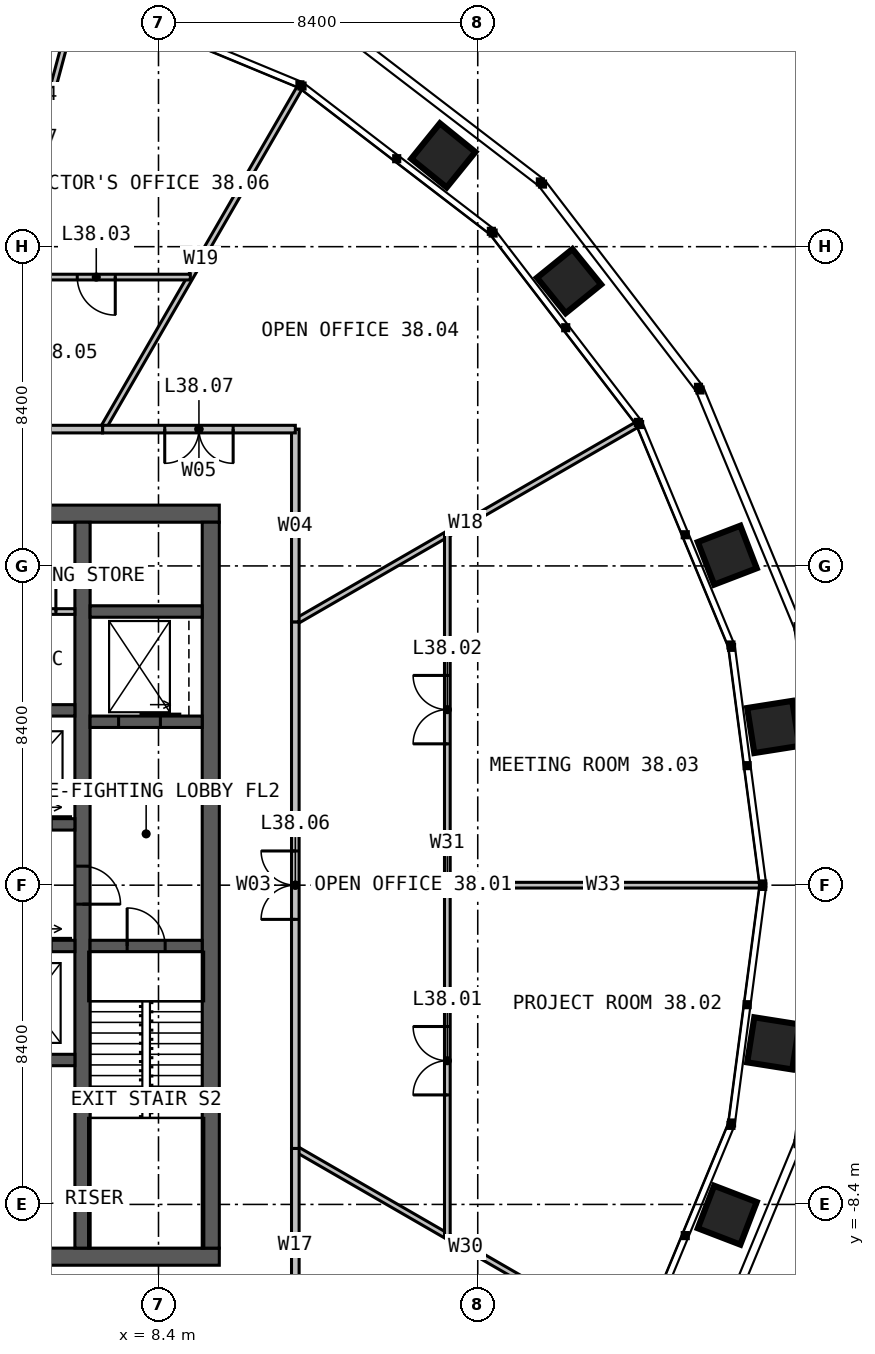
"""IFC4 building model, lengths in metres.
Left out: names, types, materials, properties, quantities, classifications, styles, units other than length and angle.
Written with IfcOpenShell. Run it as: python <this file> out.ifc"""

import sys

from ifc_helpers import new_model, si_unit, direction, frame, frame_2d, origin, place, context, subcontext, project, spatial, rectangle, extrude, element, fill, save


model = new_model("IFC4")
c1 = context("Model", 3, precision=1e-05, world=origin(), true_north=direction((0.0, 1.0)))
c2 = subcontext(c1, "Body", "Model", "MODEL_VIEW")
j1 = project(units=[si_unit("LENGTHUNIT", "METRE"), si_unit("PLANEANGLEUNIT", "RADIAN")], contexts=[c1])
p1 = place(None, origin())
s1 = spatial("IfcSite", under=j1, at=p1, CompositionType="ELEMENT")
p2 = place(p1, origin())
s2 = spatial("IfcBuilding", under=s1, at=p2, CompositionType="ELEMENT")
p3 = place(p2, frame((0.0, 0.0, 159.0)))
s3 = spatial("IfcBuildingStorey", under=s2, at=p3, CompositionType="ELEMENT", Elevation=159.0)
p4 = place(p3, frame((-10.0, 9.775, 0.0), z_axis=(0.0, 0.0, 1.0), x_axis=(1.0, 0.0, 0.0)))
e1 = element("IfcWall", 1, at=p4, inside=s3, PredefinedType="SOLIDWALL", context=c2, shape_type="SweptSolid", body=[
    extrude(rectangle(XDim=20.0, YDim=0.45, at=frame_2d((10.0, 0.0))), origin(), (0.0, 0.0, 1.0), 4.0),
])
p5 = place(p4, frame((9.4, 0.0, 0.0)))
e2 = element("IfcOpeningElement", 2, at=p5, cuts=e1, PredefinedType="OPENING", context=c2, shape_type="SweptSolid", body=[
    extrude(rectangle(XDim=1.2, YDim=2.2, at=frame_2d((0.6, 1.1))), frame((0.0, 0.235, 0.0), z_axis=(0.0, -1.0, 0.0), x_axis=(1.0, 0.0, 0.0)), (0.0, 0.0, 1.0), 0.47),
])
p6 = place(p3, frame((10.0, -9.775, 0.0), z_axis=(0.0, 0.0, 1.0), x_axis=(-1.0, 0.0, 0.0)))
e3 = element("IfcWall", 3, at=p6, inside=s3, PredefinedType="SOLIDWALL", context=c2, shape_type="SweptSolid", body=[
    extrude(rectangle(XDim=20.0, YDim=0.45, at=frame_2d((10.0, 0.0))), origin(), (0.0, 0.0, 1.0), 4.0),
])
p7 = place(p6, frame((6.875, 0.0, 0.0)))
e4 = element("IfcOpeningElement", 4, at=p7, cuts=e3, PredefinedType="OPENING", context=c2, shape_type="SweptSolid", body=[
    extrude(rectangle(XDim=1.2, YDim=2.2, at=frame_2d((0.6, 1.1))), frame((0.0, 0.235, 0.0), z_axis=(0.0, -1.0, 0.0), x_axis=(1.0, 0.0, 0.0)), (0.0, 0.0, 1.0), 0.47),
])
p8 = place(p3, frame((9.775, -9.55, 0.0), z_axis=(0.0, 0.0, 1.0), x_axis=(0.0, 1.0, 0.0)))
e5 = element("IfcWall", 5, at=p8, inside=s3, PredefinedType="SOLIDWALL", context=c2, shape_type="SweptSolid", body=[
    extrude(rectangle(XDim=19.1, YDim=0.45, at=frame_2d((9.55, 0.0))), origin(), (0.0, 0.0, 1.0), 4.0),
])
p9 = place(p3, frame((6.4, 9.55, 0.0), z_axis=(0.0, 0.0, 1.0), x_axis=(0.0, -1.0, 0.0)))
e6 = element("IfcWall", 6, at=p9, inside=s3, PredefinedType="SOLIDWALL", context=c2, shape_type="SweptSolid", body=[
    extrude(rectangle(XDim=19.1, YDim=0.4, at=frame_2d((9.55, 0.0))), origin(), (0.0, 0.0, 1.0), 4.0),
])
p10 = place(p9, frame((9.05, 0.0, 0.0)))
e7 = element("IfcOpeningElement", 7, at=p10, cuts=e6, PredefinedType="OPENING", context=c2, shape_type="SweptSolid", body=[
    extrude(rectangle(XDim=1.0, YDim=2.2, at=frame_2d((0.5, 1.1))), frame((0.0, 0.21, 0.0), z_axis=(0.0, -1.0, 0.0), x_axis=(1.0, 0.0, 0.0)), (0.0, 0.0, 1.0), 0.42),
])
p11 = place(p3, frame((1.35, 1.6, 0.0), z_axis=(0.0, 0.0, 1.0), x_axis=(1.0, 0.0, 0.0)))
e8 = element("IfcWall", 8, at=p11, inside=s3, PredefinedType="SOLIDWALL", context=c2, shape_type="SweptSolid", body=[
    extrude(rectangle(XDim=4.85, YDim=0.3, at=frame_2d((2.425, 0.0))), origin(), (0.0, 0.0, 1.0), 4.0),
])
p12 = place(p11, frame((0.6, 0.0, 0.0)))
e9 = element("IfcOpeningElement", 9, at=p12, cuts=e8, PredefinedType="OPENING", context=c2, shape_type="SweptSolid", body=[
    extrude(rectangle(XDim=1.1, YDim=2.2, at=frame_2d((0.55, 1.1))), frame((0.0, 0.16, 0.0), z_axis=(0.0, -1.0, 0.0), x_axis=(1.0, 0.0, 0.0)), (0.0, 0.0, 1.0), 0.32),
])
p13 = place(p11, frame((3.125, 0.0, 0.0)))
e10 = element("IfcOpeningElement", 10, at=p13, cuts=e8, PredefinedType="OPENING", context=c2, shape_type="SweptSolid", body=[
    extrude(rectangle(XDim=1.1, YDim=2.2, at=frame_2d((0.55, 1.1))), frame((0.0, 0.16, 0.0), z_axis=(0.0, -1.0, 0.0), x_axis=(1.0, 0.0, 0.0)), (0.0, 0.0, 1.0), 0.32),
])
p14 = place(p3, frame((1.35, 4.6, 0.0), z_axis=(0.0, 0.0, 1.0), x_axis=(1.0, 0.0, 0.0)))
e11 = element("IfcWall", 11, at=p14, inside=s3, PredefinedType="SOLIDWALL", context=c2, shape_type="SweptSolid", body=[
    extrude(rectangle(XDim=4.85, YDim=0.3, at=frame_2d((2.425, 0.0))), origin(), (0.0, 0.0, 1.0), 4.0),
])
p15 = place(p3, frame((3.85, -1.6, 0.0), z_axis=(0.0, 0.0, 1.0), x_axis=(1.0, 0.0, 0.0)))
e12 = element("IfcWall", 12, at=p15, inside=s3, PredefinedType="SOLIDWALL", context=c2, shape_type="SweptSolid", body=[
    extrude(rectangle(XDim=2.35, YDim=0.3, at=frame_2d((1.175, 0.0))), origin(), (0.0, 0.0, 1.0), 4.0),
])
p16 = place(p15, frame((0.625, 0.0, 0.0)))
e13 = element("IfcOpeningElement", 13, at=p16, cuts=e12, PredefinedType="OPENING", context=c2, shape_type="SweptSolid", body=[
    extrude(rectangle(XDim=1.1, YDim=2.2, at=frame_2d((0.55, 1.1))), frame((0.0, 0.16, 0.0), z_axis=(0.0, -1.0, 0.0), x_axis=(1.0, 0.0, 0.0)), (0.0, 0.0, 1.0), 0.32),
])
p17 = place(p3, frame((3.85, -4.6, 0.0), z_axis=(0.0, 0.0, 1.0), x_axis=(1.0, 0.0, 0.0)))
e14 = element("IfcWall", 14, at=p17, inside=s3, PredefinedType="SOLIDWALL", context=c2, shape_type="SweptSolid", body=[
    extrude(rectangle(XDim=2.35, YDim=0.3, at=frame_2d((1.175, 0.0))), origin(), (0.0, 0.0, 1.0), 4.0),
])
p18 = place(p3, frame((6.6, -1.6, 0.0), z_axis=(0.0, 0.0, 1.0), x_axis=(1.0, 0.0, 0.0)))
e15 = element("IfcWall", 15, at=p18, inside=s3, PredefinedType="SOLIDWALL", context=c2, shape_type="SweptSolid", body=[
    extrude(rectangle(XDim=2.95, YDim=0.3, at=frame_2d((1.475, 0.0))), origin(), (0.0, 0.0, 1.0), 4.0),
])
p19 = place(p18, frame((0.975, 0.0, 0.0)))
e16 = element("IfcOpeningElement", 16, at=p19, cuts=e15, PredefinedType="OPENING", context=c2, shape_type="SweptSolid", body=[
    extrude(rectangle(XDim=1.0, YDim=2.2, at=frame_2d((0.5, 1.1))), frame((0.0, 0.16, 0.0), z_axis=(0.0, -1.0, 0.0), x_axis=(1.0, 0.0, 0.0)), (0.0, 0.0, 1.0), 0.32),
])
p20 = place(p3, frame((6.6, 4.3, 0.0), z_axis=(0.0, 0.0, 1.0), x_axis=(1.0, 0.0, 0.0)))
e17 = element("IfcWall", 17, at=p20, inside=s3, PredefinedType="SOLIDWALL", context=c2, shape_type="SweptSolid", body=[
    extrude(rectangle(XDim=2.95, YDim=0.3, at=frame_2d((1.475, 0.0))), origin(), (0.0, 0.0, 1.0), 4.0),
])
p21 = place(p20, frame((0.75, 0.0, 0.0)))
e18 = element("IfcOpeningElement", 18, at=p21, cuts=e17, PredefinedType="OPENING", context=c2, shape_type="SweptSolid", body=[
    extrude(rectangle(XDim=1.1, YDim=2.2, at=frame_2d((0.55, 1.1))), frame((0.0, 0.16, 0.0), z_axis=(0.0, -1.0, 0.0), x_axis=(1.0, 0.0, 0.0)), (0.0, 0.0, 1.0), 0.32),
])
p22 = place(p3, frame((6.6, 7.2, 0.0), z_axis=(0.0, 0.0, 1.0), x_axis=(1.0, 0.0, 0.0)))
e19 = element("IfcWall", 19, at=p22, inside=s3, PredefinedType="SOLIDWALL", context=c2, shape_type="SweptSolid", body=[
    extrude(rectangle(XDim=2.95, YDim=0.3, at=frame_2d((1.475, 0.0))), origin(), (0.0, 0.0, 1.0), 4.0),
])
p23 = place(p3, frame((1.35, 7.2, 0.0), z_axis=(0.0, 0.0, 1.0), x_axis=(1.0, 0.0, 0.0)))
e20 = element("IfcWall", 20, at=p23, inside=s3, PredefinedType="PARTITIONING", context=c2, shape_type="SweptSolid", body=[
    extrude(rectangle(XDim=4.85, YDim=0.15, at=frame_2d((2.425, 0.0))), origin(), (0.0, 0.0, 1.0), 3.75),
])
p24 = place(p23, frame((3.45, 0.0, 0.0)))
e21 = element("IfcOpeningElement", 21, at=p24, cuts=e20, PredefinedType="OPENING", context=c2, shape_type="SweptSolid", body=[
    extrude(rectangle(XDim=0.9, YDim=2.2, at=frame_2d((0.45, 1.1))), frame((0.0, 0.085, 0.0), z_axis=(0.0, -1.0, 0.0), x_axis=(1.0, 0.0, 0.0)), (0.0, 0.0, 1.0), 0.17),
])
for number, where, z_axis, x_axis in (
    (22, (12.0, -6.928, 0.0), (0.0, 0.0, 1.0), (0.866, -0.5, 0.0)),
    (23, (12.0, 6.928, 0.0), (0.0, 0.0, 1.0), (0.866, 0.5, 0.0)),
    (24, (6.928, 12.0, 0.0), (0.0, 0.0, 1.0), (0.5, 0.866, 0.0)),
):
    element("IfcWall", number, at=place(p3, frame(where, z_axis=z_axis, x_axis=x_axis)), inside=s3, PredefinedType="PARTITIONING", context=c2, shape_type="SweptSolid", body=[
        extrude(rectangle(XDim=10.355, YDim=0.15, at=frame_2d((5.177, 0.0))), origin(), (0.0, 0.0, 1.0), 2.79),
    ])
p25 = place(p3, frame((16.0, -9.238, 0.0), z_axis=(0.0, 0.0, 1.0), x_axis=(0.0, 1.0, 0.0)))
e25 = element("IfcWall", 25, at=p25, inside=s3, PredefinedType="PARTITIONING", context=c2, shape_type="SweptSolid", body=[
    extrude(rectangle(XDim=18.475, YDim=0.15, at=frame_2d((9.238, 0.0))), origin(), (0.0, 0.0, 1.0), 2.79),
])
p26 = place(p25, frame((3.719, 0.0, 0.0)))
e26 = element("IfcOpeningElement", 26, at=p26, cuts=e25, PredefinedType="OPENING", context=c2, shape_type="SweptSolid", body=[
    extrude(rectangle(XDim=1.8, YDim=2.2, at=frame_2d((0.9, 1.1))), frame((0.0, 0.085, 0.0), z_axis=(0.0, -1.0, 0.0), x_axis=(1.0, 0.0, 0.0)), (0.0, 0.0, 1.0), 0.17),
])
p27 = place(p25, frame((12.956, 0.0, 0.0)))
e27 = element("IfcOpeningElement", 27, at=p27, cuts=e25, PredefinedType="OPENING", context=c2, shape_type="SweptSolid", body=[
    extrude(rectangle(XDim=1.8, YDim=2.2, at=frame_2d((0.9, 1.1))), frame((0.0, 0.085, 0.0), z_axis=(0.0, -1.0, 0.0), x_axis=(1.0, 0.0, 0.0)), (0.0, 0.0, 1.0), 0.17),
])
p28 = place(p3, frame((16.0, 0.0, 0.0), z_axis=(0.0, 0.0, 1.0), x_axis=(1.0, 0.0, 0.0)))
e28 = element("IfcWall", 28, at=p28, inside=s3, PredefinedType="PARTITIONING", context=c2, shape_type="SweptSolid", body=[
    extrude(rectangle(XDim=8.211, YDim=0.15, at=frame_2d((4.105, 0.0))), origin(), (0.0, 0.0, 1.0), 2.79),
])
p29 = place(p3, frame((12.0, -6.928, 0.0), z_axis=(0.0, 0.0, 1.0), x_axis=(0.0, 1.0, 0.0)))
e29 = element("IfcWall", 29, at=p29, inside=s3, PredefinedType="PARTITIONING", context=c2, shape_type="SweptSolid", body=[
    extrude(rectangle(XDim=13.856, YDim=0.2, at=frame_2d((6.928, 0.0))), origin(), (0.0, 0.0, 1.0), 3.8),
])
p30 = place(p29, frame((6.028, 0.0, 0.0)))
e30 = element("IfcOpeningElement", 30, at=p30, cuts=e29, PredefinedType="OPENING", context=c2, shape_type="SweptSolid", body=[
    extrude(rectangle(XDim=1.8, YDim=2.2, at=frame_2d((0.9, 1.1))), frame((0.0, 0.11, 0.0), z_axis=(0.0, -1.0, 0.0), x_axis=(1.0, 0.0, 0.0)), (0.0, 0.0, 1.0), 0.22),
])
p31 = place(p3, frame((12.0, 6.928, 0.0), z_axis=(0.0, 0.0, 1.0), x_axis=(0.0, 1.0, 0.0)))
e31 = element("IfcWall", 31, at=p31, inside=s3, PredefinedType="PARTITIONING", context=c2, shape_type="SweptSolid", body=[
    extrude(rectangle(XDim=5.072, YDim=0.2, at=frame_2d((2.536, 0.0))), origin(), (0.0, 0.0, 1.0), 3.8),
])
p32 = place(p3, frame((12.0, 12.0, 0.0), z_axis=(0.0, 0.0, 1.0), x_axis=(-1.0, 0.0, 0.0)))
e32 = element("IfcWall", 32, at=p32, inside=s3, PredefinedType="PARTITIONING", context=c2, shape_type="SweptSolid", body=[
    extrude(rectangle(XDim=5.072, YDim=0.2, at=frame_2d((2.536, 0.0))), origin(), (0.0, 0.0, 1.0), 3.8),
])
p33 = place(p32, frame((1.636, 0.0, 0.0)))
e33 = element("IfcOpeningElement", 33, at=p33, cuts=e32, PredefinedType="OPENING", context=c2, shape_type="SweptSolid", body=[
    extrude(rectangle(XDim=1.8, YDim=2.2, at=frame_2d((0.9, 1.1))), frame((0.0, 0.11, 0.0), z_axis=(0.0, -1.0, 0.0), x_axis=(1.0, 0.0, 0.0)), (0.0, 0.0, 1.0), 0.22),
])
p34 = place(p3, frame((9.238, 16.0, 0.0), z_axis=(0.0, 0.0, 1.0), x_axis=(-1.0, 0.0, 0.0)))
e34 = element("IfcWall", 34, at=p34, inside=s3, PredefinedType="PARTITIONING", context=c2, shape_type="SweptSolid", body=[
    extrude(rectangle(XDim=9.238, YDim=0.15, at=frame_2d((4.619, 0.0))), origin(), (0.0, 0.0, 1.0), 2.79),
])
p35 = place(p34, frame((1.975, 0.0, 0.0)))
e35 = element("IfcOpeningElement", 35, at=p35, cuts=e34, PredefinedType="OPENING", context=c2, shape_type="SweptSolid", body=[
    extrude(rectangle(XDim=1.0, YDim=2.2, at=frame_2d((0.5, 1.1))), frame((0.0, 0.085, 0.0), z_axis=(0.0, -1.0, 0.0), x_axis=(1.0, 0.0, 0.0)), (0.0, 0.0, 1.0), 0.17),
])
p36 = place(p34, frame((5.541, 0.0, 0.0)))
e36 = element("IfcOpeningElement", 36, at=p36, cuts=e34, PredefinedType="OPENING", context=c2, shape_type="SweptSolid", body=[
    extrude(rectangle(XDim=1.0, YDim=2.2, at=frame_2d((0.5, 1.1))), frame((0.0, 0.085, 0.0), z_axis=(0.0, -1.0, 0.0), x_axis=(1.0, 0.0, 0.0)), (0.0, 0.0, 1.0), 0.17),
])
p37 = place(p34, frame((7.684, 0.0, 0.0)))
e37 = element("IfcOpeningElement", 37, at=p37, cuts=e34, PredefinedType="OPENING", context=c2, shape_type="SweptSolid", body=[
    extrude(rectangle(XDim=1.0, YDim=2.2, at=frame_2d((0.5, 1.1))), frame((0.0, 0.085, 0.0), z_axis=(0.0, -1.0, 0.0), x_axis=(1.0, 0.0, 0.0)), (0.0, 0.0, 1.0), 0.17),
])
p38 = place(p3, frame((4.287, 16.0, 0.0), z_axis=(0.0, 0.0, 1.0), x_axis=(0.25883290061, 0.965922113611, 0.0)))
e38 = element("IfcWall", 38, at=p38, inside=s3, PredefinedType="PARTITIONING", context=c2, shape_type="SweptSolid", body=[
    extrude(rectangle(XDim=7.647, YDim=0.15, at=frame_2d((3.823, 0.0))), origin(), (0.0, 0.0, 1.0), 2.79),
])
p39 = place(p3, frame((6.928, 12.0, 0.0), z_axis=(0.0, 0.0, 1.0), x_axis=(-1.0, 0.0, 0.0)))
e39 = element("IfcWall", 39, at=p39, inside=s3, PredefinedType="PARTITIONING", context=c2, shape_type="SweptSolid", body=[
    extrude(rectangle(XDim=6.928, YDim=0.2, at=frame_2d((3.464, 0.0))), origin(), (0.0, 0.0, 1.0), 3.8),
])
p40 = place(p39, frame((2.964, 0.0, 0.0)))
e40 = element("IfcOpeningElement", 40, at=p40, cuts=e39, PredefinedType="OPENING", context=c2, shape_type="SweptSolid", body=[
    extrude(rectangle(XDim=1.0, YDim=2.2, at=frame_2d((0.5, 1.1))), frame((0.0, 0.11, 0.0), z_axis=(0.0, -1.0, 0.0), x_axis=(1.0, 0.0, 0.0)), (0.0, 0.0, 1.0), 0.22),
])
p41 = place(p3, frame((12.0, -12.0, 0.0), z_axis=(0.0, 0.0, 1.0), x_axis=(0.0, 1.0, 0.0)))
e41 = element("IfcWall", 41, at=p41, inside=s3, PredefinedType="PARTITIONING", context=c2, shape_type="SweptSolid", body=[
    extrude(rectangle(XDim=5.072, YDim=0.2, at=frame_2d((2.536, 0.0))), origin(), (0.0, 0.0, 1.0), 3.8),
])
p42 = place(p10, origin())
e42 = element("IfcDoor", 42, at=p42, inside=s3, OperationType="SINGLE_SWING_RIGHT", PredefinedType="DOOR", context=c2, shape_type="SweptSolid", body=[
    extrude(rectangle(XDim=1.0, YDim=2.2, at=frame_2d((0.5, 1.1))), frame((0.0, 0.025, 0.0), z_axis=(0.0, -1.0, 0.0), x_axis=(1.0, 0.0, 0.0)), (0.0, 0.0, 1.0), 0.05),
])
fill(e7, e42)
p43 = place(p19, origin())
e43 = element("IfcDoor", 43, at=p43, inside=s3, OperationType="SINGLE_SWING_LEFT", PredefinedType="DOOR", context=c2, shape_type="SweptSolid", body=[
    extrude(rectangle(XDim=1.0, YDim=2.2, at=frame_2d((0.5, 1.1))), frame((0.0, 0.025, 0.0), z_axis=(0.0, -1.0, 0.0), x_axis=(1.0, 0.0, 0.0)), (0.0, 0.0, 1.0), 0.05),
])
fill(e16, e43)
p44 = place(p24, origin())
e44 = element("IfcDoor", 44, at=p44, inside=s3, OperationType="SINGLE_SWING_RIGHT", PredefinedType="DOOR", context=c2, shape_type="SweptSolid", body=[
    extrude(rectangle(XDim=0.9, YDim=2.2, at=frame_2d((0.45, 1.1))), frame((0.0, 0.025, 0.0), z_axis=(0.0, -1.0, 0.0), x_axis=(1.0, 0.0, 0.0)), (0.0, 0.0, 1.0), 0.05),
])
fill(e21, e44)
p45 = place(p21, origin())
e45 = element("IfcDoor", 45, at=p45, inside=s3, OperationType="SLIDING_TO_LEFT", PredefinedType="DOOR", context=c2, shape_type="SweptSolid", body=[
    extrude(rectangle(XDim=1.1, YDim=2.2, at=frame_2d((0.55, 1.1))), frame((0.0, 0.025, 0.0), z_axis=(0.0, -1.0, 0.0), x_axis=(1.0, 0.0, 0.0)), (0.0, 0.0, 1.0), 0.05),
])
fill(e18, e45)
p46 = place(p26, origin())
e46 = element("IfcDoor", 46, at=p46, inside=s3, OperationType="DOUBLE_DOOR_SINGLE_SWING", PredefinedType="DOOR", context=c2, shape_type="SweptSolid", body=[
    extrude(rectangle(XDim=1.8, YDim=2.2, at=frame_2d((0.9, 1.1))), frame((0.0, 0.025, 0.0), z_axis=(0.0, -1.0, 0.0), x_axis=(1.0, 0.0, 0.0)), (0.0, 0.0, 1.0), 0.05),
])
fill(e26, e46)
p47 = place(p27, origin())
e47 = element("IfcDoor", 47, at=p47, inside=s3, OperationType="DOUBLE_DOOR_SINGLE_SWING", PredefinedType="DOOR", context=c2, shape_type="SweptSolid", body=[
    extrude(rectangle(XDim=1.8, YDim=2.2, at=frame_2d((0.9, 1.1))), frame((0.0, 0.025, 0.0), z_axis=(0.0, -1.0, 0.0), x_axis=(1.0, 0.0, 0.0)), (0.0, 0.0, 1.0), 0.05),
])
fill(e27, e47)
p48 = place(p30, origin())
e48 = element("IfcDoor", 48, at=p48, inside=s3, OperationType="DOUBLE_DOOR_SINGLE_SWING", PredefinedType="DOOR", context=c2, shape_type="SweptSolid", body=[
    extrude(rectangle(XDim=1.8, YDim=2.2, at=frame_2d((0.9, 1.1))), frame((0.0, 0.025, 0.0), z_axis=(0.0, -1.0, 0.0), x_axis=(1.0, 0.0, 0.0)), (0.0, 0.0, 1.0), 0.05),
])
fill(e30, e48)
p49 = place(p33, origin())
e49 = element("IfcDoor", 49, at=p49, inside=s3, OperationType="DOUBLE_DOOR_SINGLE_SWING", PredefinedType="DOOR", context=c2, shape_type="SweptSolid", body=[
    extrude(rectangle(XDim=1.8, YDim=2.2, at=frame_2d((0.9, 1.1))), frame((0.0, 0.025, 0.0), z_axis=(0.0, -1.0, 0.0), x_axis=(1.0, 0.0, 0.0)), (0.0, 0.0, 1.0), 0.05),
])
fill(e33, e49)
p50 = place(p35, origin())
e50 = element("IfcDoor", 50, at=p50, inside=s3, OperationType="SINGLE_SWING_LEFT", PredefinedType="DOOR", context=c2, shape_type="SweptSolid", body=[
    extrude(rectangle(XDim=1.0, YDim=2.2, at=frame_2d((0.5, 1.1))), frame((0.0, 0.025, 0.0), z_axis=(0.0, -1.0, 0.0), x_axis=(1.0, 0.0, 0.0)), (0.0, 0.0, 1.0), 0.05),
])
fill(e35, e50)
save(model, sys.argv[1])
